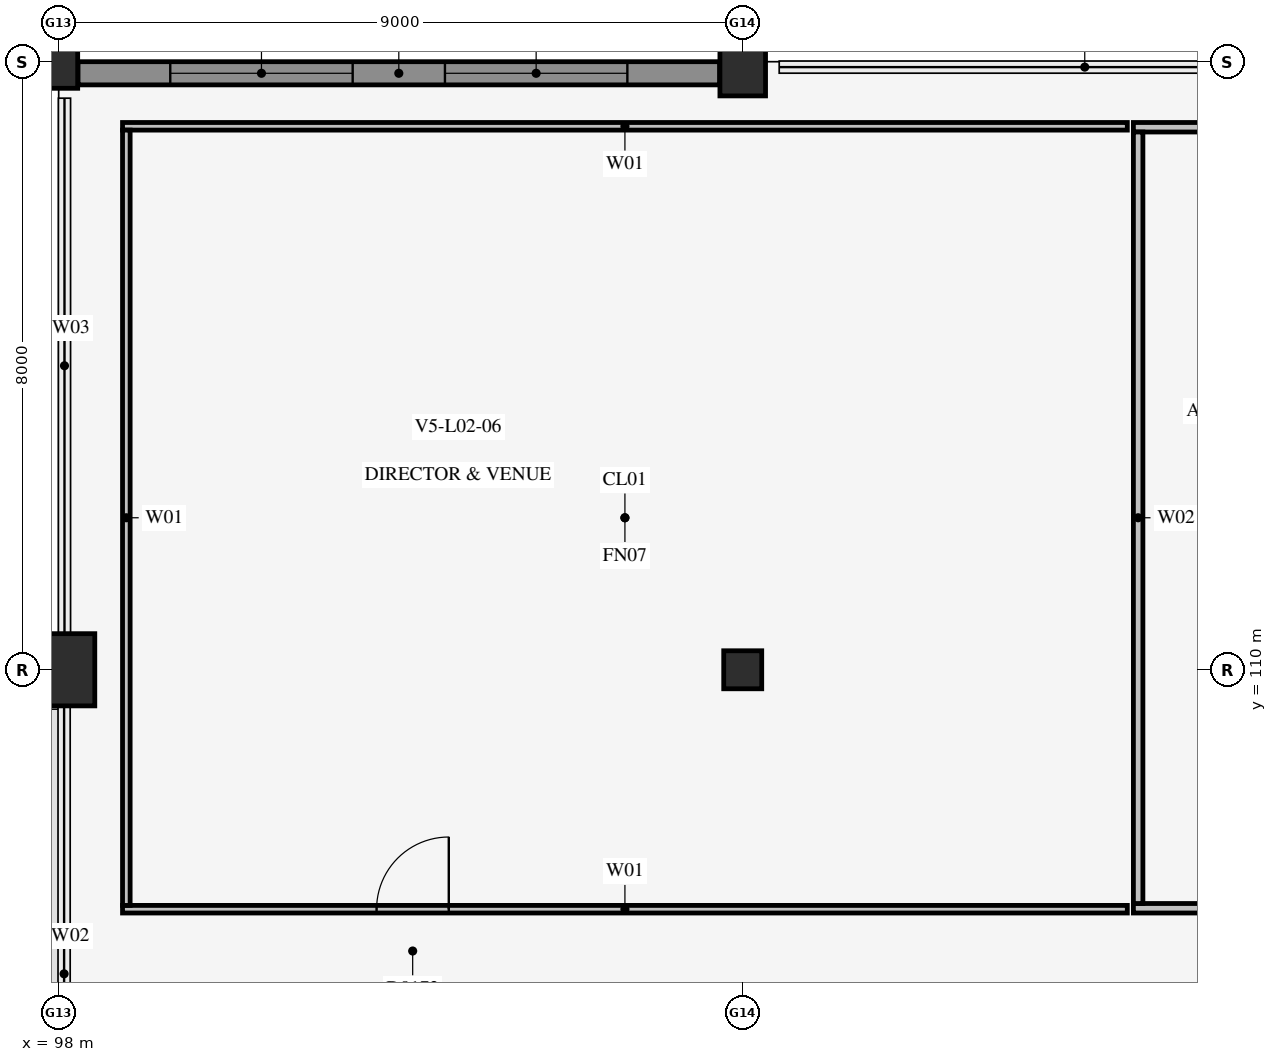
"""IFC4 building model, lengths in metres.
Left out: names, types, materials, properties, quantities, classifications, styles, units other than length and angle.
Written with IfcOpenShell. Run it as: python <this file> out.ifc"""

import sys

from ifc_helpers import new_model, si_unit, direction, frame, frame_2d, origin, origin_2d, place, context, subcontext, project, spatial, rectangle, circle, extrude, element, fill, save


model = new_model("IFC4")
c1 = context("Model", 3, precision=1e-05, world=origin(), true_north=direction((0.0, 1.0)))
c2 = subcontext(c1, "Body", "Model", "MODEL_VIEW")
j1 = project(units=[si_unit("LENGTHUNIT", "METRE"), si_unit("PLANEANGLEUNIT", "RADIAN")], contexts=[c1])
p1 = place(None, origin())
s1 = spatial("IfcSite", under=j1, at=p1, CompositionType="ELEMENT")
p2 = place(p1, origin())
s2 = spatial("IfcBuilding", under=s1, at=p2, CompositionType="ELEMENT")
p3 = place(p2, frame((0.0, 0.0, 10.2)))
s3 = spatial("IfcBuildingStorey", under=s2, at=p3, CompositionType="ELEMENT", Elevation=10.2)
p4 = place(p3, frame((98.0, 110.0, 0.0), z_axis=(0.0, 0.0, 1.0), x_axis=(1.0, 0.0, 0.0)))
e1 = element("IfcColumn", 1, at=p4, inside=s3, PredefinedType="COLUMN", context=c2, shape_type="SweptSolid", body=[
    extrude(rectangle(XDim=0.95, YDim=0.95, at=origin_2d()), origin(), (0.0, 0.0, 1.0), 4.3),
])
p5 = place(p3, frame((98.0, 118.0, 0.0), z_axis=(0.0, 0.0, 1.0), x_axis=(1.0, 0.0, 0.0)))
e2 = element("IfcColumn", 2, at=p5, inside=s3, PredefinedType="COLUMN", context=c2, shape_type="SweptSolid", body=[
    extrude(rectangle(XDim=0.5, YDim=0.7, at=origin_2d()), origin(), (0.0, 0.0, 1.0), 4.3),
])
p6 = place(p3, frame((107.0, 110.0, 0.0), z_axis=(0.0, 0.0, 1.0), x_axis=(1.0, 0.0, 0.0)))
e3 = element("IfcColumn", 3, at=p6, inside=s3, PredefinedType="COLUMN", context=c2, shape_type="SweptSolid", body=[
    extrude(circle(Radius=0.25, at=origin_2d()), origin(), (0.0, 0.0, 1.0), 4.6),
])
p7 = place(p3, frame((107.0, 118.0, 0.0), z_axis=(0.0, 0.0, 1.0), x_axis=(1.0, 0.0, 0.0)))
e4 = element("IfcColumn", 4, at=p7, inside=s3, PredefinedType="COLUMN", context=c2, shape_type="SweptSolid", body=[
    extrude(rectangle(XDim=0.6, YDim=0.9, at=origin_2d()), origin(), (0.0, 0.0, 1.0), 4.6),
])
p8 = place(p3, frame((98.84, 106.85, 0.0), z_axis=(0.0, 0.0, 1.0), x_axis=(1.0, 0.0, 0.0)))
e5 = element("IfcWall", 5, at=p8, inside=s3, PredefinedType="PARTITIONING", context=c2, shape_type="SweptSolid", body=[
    extrude(rectangle(XDim=13.22, YDim=0.1, at=frame_2d((6.61, 0.0))), origin(), (0.0, 0.0, 1.0), 4.285),
])
p9 = place(p8, frame((3.343, 0.0, 0.0)))
e6 = element("IfcOpeningElement", 6, at=p9, cuts=e5, PredefinedType="OPENING", context=c2, shape_type="SweptSolid", body=[
    extrude(rectangle(XDim=0.95, YDim=2.15, at=frame_2d((0.475, 1.075))), frame((0.0, 0.062, 0.0), z_axis=(0.0, -1.0, 0.0), x_axis=(1.0, 0.0, 0.0)), (0.0, 0.0, 1.0), 0.124),
])
p10 = place(p3, frame((98.84, 117.15, 0.0), z_axis=(0.0, 0.0, 1.0), x_axis=(1.0, 0.0, 0.0)))
e7 = element("IfcWall", 7, at=p10, inside=s3, PredefinedType="PARTITIONING", context=c2, shape_type="SweptSolid", body=[
    extrude(rectangle(XDim=13.22, YDim=0.1, at=frame_2d((6.61, 0.0))), origin(), (0.0, 0.0, 1.0), 4.285),
])
p11 = place(p3, frame((98.89, 106.9, 0.0), z_axis=(0.0, 0.0, 1.0), x_axis=(0.0, 1.0, 0.0)))
e8 = element("IfcWall", 8, at=p11, inside=s3, PredefinedType="PARTITIONING", context=c2, shape_type="SweptSolid", body=[
    extrude(rectangle(XDim=10.2, YDim=0.1, at=frame_2d((5.1, 0.0))), origin(), (0.0, 0.0, 1.0), 4.285),
])
p12 = place(p3, frame((112.14, 106.863, 0.0), z_axis=(0.0, 0.0, 1.0), x_axis=(1.0, 0.0, 0.0)))
e9 = element("IfcWall", 9, at=p12, inside=s3, PredefinedType="PARTITIONING", context=c2, shape_type="SweptSolid", body=[
    extrude(rectangle(XDim=13.22, YDim=0.125, at=frame_2d((6.61, 0.0))), origin(), (0.0, 0.0, 1.0), 4.365),
])
p13 = place(p12, frame((7.413, 0.0, 0.0)))
e10 = element("IfcOpeningElement", 10, at=p13, cuts=e9, PredefinedType="OPENING", context=c2, shape_type="SweptSolid", body=[
    extrude(rectangle(XDim=1.05, YDim=2.15, at=frame_2d((0.525, 1.075))), frame((0.0, 0.074, 0.0), z_axis=(0.0, -1.0, 0.0), x_axis=(1.0, 0.0, 0.0)), (0.0, 0.0, 1.0), 0.149),
])
p14 = place(p3, frame((112.14, 117.137, 0.0), z_axis=(0.0, 0.0, 1.0), x_axis=(1.0, 0.0, 0.0)))
e11 = element("IfcWall", 11, at=p14, inside=s3, PredefinedType="PARTITIONING", context=c2, shape_type="SweptSolid", body=[
    extrude(rectangle(XDim=13.22, YDim=0.125, at=frame_2d((6.61, 0.0))), origin(), (0.0, 0.0, 1.0), 4.365),
])
p15 = place(p3, frame((112.202, 106.925, 0.0), z_axis=(0.0, 0.0, 1.0), x_axis=(0.0, 1.0, 0.0)))
e12 = element("IfcWall", 12, at=p15, inside=s3, PredefinedType="PARTITIONING", context=c2, shape_type="SweptSolid", body=[
    extrude(rectangle(XDim=10.15, YDim=0.125, at=frame_2d((5.075, 0.0))), origin(), (0.0, 0.0, 1.0), 4.365),
])
p16 = place(p3, frame((98.254, 117.847, 0.0), z_axis=(0.0, 0.0, 1.0), x_axis=(1.0, 0.0, 0.0)))
e13 = element("IfcWall", 13, at=p16, inside=s3, PredefinedType="SOLIDWALL", context=c2, shape_type="SweptSolid", body=[
    extrude(rectangle(XDim=8.442, YDim=0.305, at=frame_2d((4.221, 0.0))), origin(), (0.0, 0.0, 1.0), 3.81),
])
p17 = place(p16, frame((1.214, 0.0, 0.95)))
e14 = element("IfcOpeningElement", 14, at=p17, cuts=e13, PredefinedType="OPENING", context=c2, shape_type="SweptSolid", body=[
    extrude(rectangle(XDim=2.4, YDim=1.2, at=frame_2d((1.2, 0.6))), frame((0.0, 0.165, 0.0), z_axis=(0.0, -1.0, 0.0), x_axis=(1.0, 0.0, 0.0)), (0.0, 0.0, 1.0), 0.329),
])
p18 = place(p16, frame((4.828, 0.0, 0.95)))
e15 = element("IfcOpeningElement", 15, at=p18, cuts=e13, PredefinedType="OPENING", context=c2, shape_type="SweptSolid", body=[
    extrude(rectangle(XDim=2.4, YDim=1.2, at=frame_2d((1.2, 0.6))), frame((0.0, 0.165, 0.0), z_axis=(0.0, -1.0, 0.0), x_axis=(1.0, 0.0, 0.0)), (0.0, 0.0, 1.0), 0.329),
])
p19 = place(p9, origin())
e16 = element("IfcDoor", 16, at=p19, inside=s3, OperationType="SINGLE_SWING_RIGHT", PredefinedType="DOOR", context=c2, shape_type="SweptSolid", body=[
    extrude(rectangle(XDim=0.95, YDim=2.15, at=frame_2d((0.475, 1.075))), frame((0.0, 0.025, 0.0), z_axis=(0.0, -1.0, 0.0), x_axis=(1.0, 0.0, 0.0)), (0.0, 0.0, 1.0), 0.05),
])
fill(e6, e16)
p20 = place(p17, origin())
e17 = element("IfcWindow", 17, at=p20, inside=s3, PartitioningType="SINGLE_PANEL", PredefinedType="WINDOW", context=c2, shape_type="SweptSolid", body=[
    extrude(rectangle(XDim=2.4, YDim=1.2, at=frame_2d((1.2, 0.6))), frame((0.0, 0.03, 0.0), z_axis=(0.0, -1.0, 0.0), x_axis=(1.0, 0.0, 0.0)), (0.0, 0.0, 1.0), 0.06),
])
fill(e14, e17)
p21 = place(p18, origin())
e18 = element("IfcWindow", 18, at=p21, inside=s3, PartitioningType="SINGLE_PANEL", PredefinedType="WINDOW", context=c2, shape_type="SweptSolid", body=[
    extrude(rectangle(XDim=2.4, YDim=1.2, at=frame_2d((1.2, 0.6))), frame((0.0, 0.03, 0.0), z_axis=(0.0, -1.0, 0.0), x_axis=(1.0, 0.0, 0.0)), (0.0, 0.0, 1.0), 0.06),
])
fill(e15, e18)
save(model, sys.argv[1])
